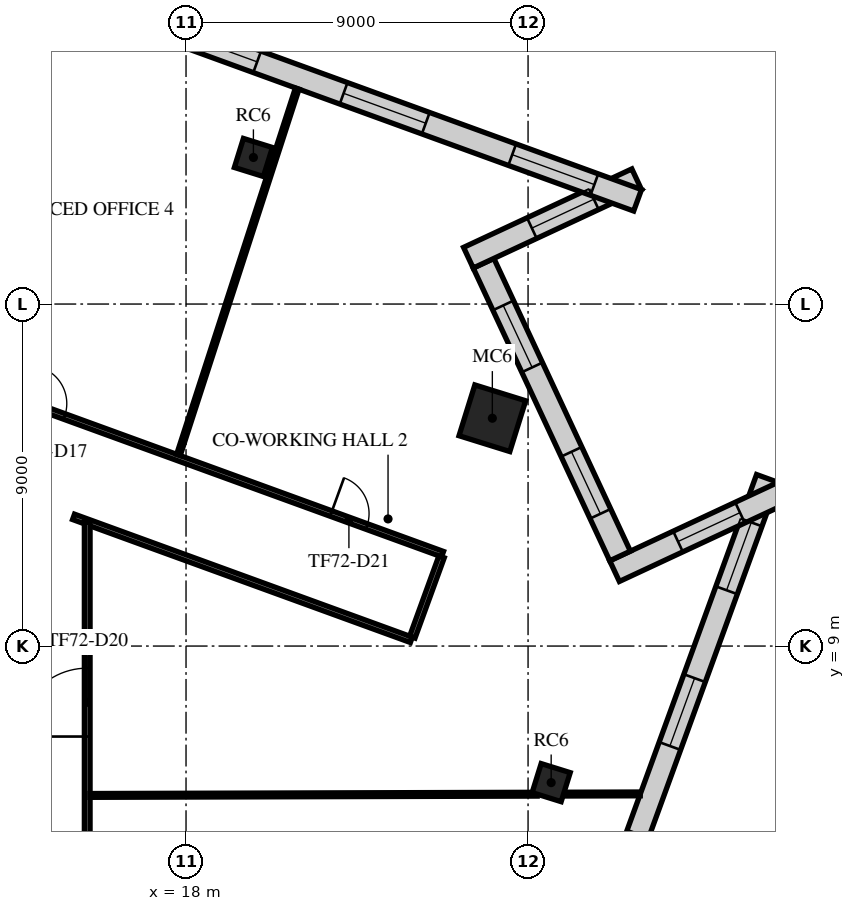
"""IFC4 building model, lengths in metres.
Left out: names, types, materials, properties, quantities, classifications, styles, units other than length and angle.
Written with IfcOpenShell. Run it as: python <this file> out.ifc"""

import sys

from ifc_helpers import new_model, si_unit, direction, frame, frame_2d, origin, origin_2d, place, context, subcontext, project, spatial, rectangle, extrude, element, fill, save


model = new_model("IFC4")
c1 = context("Model", 3, precision=1e-05, world=origin(), true_north=direction((0.0, 1.0)))
c2 = subcontext(c1, "Body", "Model", "MODEL_VIEW")
j1 = project(units=[si_unit("LENGTHUNIT", "METRE"), si_unit("PLANEANGLEUNIT", "RADIAN")], contexts=[c1])
p1 = place(None, origin())
s1 = spatial("IfcSite", under=j1, at=p1, CompositionType="ELEMENT")
p2 = place(p1, origin())
s2 = spatial("IfcBuilding", under=s1, at=p2, CompositionType="ELEMENT")
p3 = place(p2, frame((0.0, 0.0, 304.5)))
s3 = spatial("IfcBuildingStorey", under=s2, at=p3, CompositionType="ELEMENT", Elevation=304.5)
p4 = place(p3, frame((27.608, 5.406, 0.0), z_axis=(0.0, 0.0, 1.0), x_axis=(0.297503182032, 0.954720826567, 0.0)))
e1 = element("IfcColumn", 1, at=p4, inside=s3, PredefinedType="COLUMN", context=c2, shape_type="SweptSolid", body=[
    extrude(rectangle(XDim=0.8, YDim=0.8, at=origin_2d()), origin(), (0.0, 0.0, 1.0), 4.0),
])
p5 = place(p3, frame((26.06, 14.995, 0.0), z_axis=(0.0, 0.0, 1.0), x_axis=(0.297503182032, 0.954720826567, 0.0)))
e2 = element("IfcColumn", 2, at=p5, inside=s3, PredefinedType="COLUMN", context=c2, shape_type="SweptSolid", body=[
    extrude(rectangle(XDim=1.4, YDim=1.4, at=origin_2d()), origin(), (0.0, 0.0, 1.0), 4.0),
])
p6 = place(p3, frame((19.773, 21.857, 0.0), z_axis=(0.0, 0.0, 1.0), x_axis=(0.297503182032, 0.954720826567, 0.0)))
e3 = element("IfcColumn", 3, at=p6, inside=s3, PredefinedType="COLUMN", context=c2, shape_type="SweptSolid", body=[
    extrude(rectangle(XDim=0.8, YDim=0.8, at=origin_2d()), origin(), (0.0, 0.0, 1.0), 4.0),
])
p7 = place(p3, frame((16.885, -31.675, 0.0), z_axis=(0.0, 0.0, 1.0), x_axis=(0.342016786282, 0.939693842643, 0.0)))
e4 = element("IfcWall", 4, at=p7, inside=s3, PredefinedType="STANDARD", context=c2, shape_type="SweptSolid", body=[
    extrude(rectangle(XDim=47.979, YDim=0.6, at=frame_2d((23.99, 0.0))), origin(), (0.0, 0.0, 1.0), 3.65),
])
p8 = place(p7, frame((1.231, 0.0, 0.9)))
e5 = element("IfcOpeningElement", 5, at=p8, cuts=e4, PredefinedType="OPENING", context=c2, shape_type="SweptSolid", body=[
    extrude(rectangle(XDim=1.9, YDim=2.1, at=frame_2d((0.95, 1.05))), frame((0.0, 0.31, 0.0), z_axis=(0.0, -1.0, 0.0), x_axis=(1.0, 0.0, 0.0)), (0.0, 0.0, 1.0), 0.62),
])
p9 = place(p7, frame((5.593, 0.0, 0.9)))
e6 = element("IfcOpeningElement", 6, at=p9, cuts=e4, PredefinedType="OPENING", context=c2, shape_type="SweptSolid", body=[
    extrude(rectangle(XDim=1.9, YDim=2.1, at=frame_2d((0.95, 1.05))), frame((0.0, 0.31, 0.0), z_axis=(0.0, -1.0, 0.0), x_axis=(1.0, 0.0, 0.0)), (0.0, 0.0, 1.0), 0.62),
])
p10 = place(p7, frame((9.954, 0.0, 0.9)))
e7 = element("IfcOpeningElement", 7, at=p10, cuts=e4, PredefinedType="OPENING", context=c2, shape_type="SweptSolid", body=[
    extrude(rectangle(XDim=1.9, YDim=2.1, at=frame_2d((0.95, 1.05))), frame((0.0, 0.31, 0.0), z_axis=(0.0, -1.0, 0.0), x_axis=(1.0, 0.0, 0.0)), (0.0, 0.0, 1.0), 0.62),
])
p11 = place(p7, frame((14.316, 0.0, 0.9)))
e8 = element("IfcOpeningElement", 8, at=p11, cuts=e4, PredefinedType="OPENING", context=c2, shape_type="SweptSolid", body=[
    extrude(rectangle(XDim=1.9, YDim=2.1, at=frame_2d((0.95, 1.05))), frame((0.0, 0.31, 0.0), z_axis=(0.0, -1.0, 0.0), x_axis=(1.0, 0.0, 0.0)), (0.0, 0.0, 1.0), 0.62),
])
p12 = place(p7, frame((18.678, 0.0, 0.9)))
e9 = element("IfcOpeningElement", 9, at=p12, cuts=e4, PredefinedType="OPENING", context=c2, shape_type="SweptSolid", body=[
    extrude(rectangle(XDim=1.9, YDim=2.1, at=frame_2d((0.95, 1.05))), frame((0.0, 0.31, 0.0), z_axis=(0.0, -1.0, 0.0), x_axis=(1.0, 0.0, 0.0)), (0.0, 0.0, 1.0), 0.62),
])
p13 = place(p7, frame((23.04, 0.0, 0.9)))
e10 = element("IfcOpeningElement", 10, at=p13, cuts=e4, PredefinedType="OPENING", context=c2, shape_type="SweptSolid", body=[
    extrude(rectangle(XDim=1.9, YDim=2.1, at=frame_2d((0.95, 1.05))), frame((0.0, 0.31, 0.0), z_axis=(0.0, -1.0, 0.0), x_axis=(1.0, 0.0, 0.0)), (0.0, 0.0, 1.0), 0.62),
])
p14 = place(p7, frame((27.401, 0.0, 0.9)))
e11 = element("IfcOpeningElement", 11, at=p14, cuts=e4, PredefinedType="OPENING", context=c2, shape_type="SweptSolid", body=[
    extrude(rectangle(XDim=1.9, YDim=2.1, at=frame_2d((0.95, 1.05))), frame((0.0, 0.31, 0.0), z_axis=(0.0, -1.0, 0.0), x_axis=(1.0, 0.0, 0.0)), (0.0, 0.0, 1.0), 0.62),
])
p15 = place(p7, frame((31.763, 0.0, 0.9)))
e12 = element("IfcOpeningElement", 12, at=p15, cuts=e4, PredefinedType="OPENING", context=c2, shape_type="SweptSolid", body=[
    extrude(rectangle(XDim=1.9, YDim=2.1, at=frame_2d((0.95, 1.05))), frame((0.0, 0.31, 0.0), z_axis=(0.0, -1.0, 0.0), x_axis=(1.0, 0.0, 0.0)), (0.0, 0.0, 1.0), 0.62),
])
p16 = place(p7, frame((36.125, 0.0, 0.9)))
e13 = element("IfcOpeningElement", 13, at=p16, cuts=e4, PredefinedType="OPENING", context=c2, shape_type="SweptSolid", body=[
    extrude(rectangle(XDim=1.9, YDim=2.1, at=frame_2d((0.95, 1.05))), frame((0.0, 0.31, 0.0), z_axis=(0.0, -1.0, 0.0), x_axis=(1.0, 0.0, 0.0)), (0.0, 0.0, 1.0), 0.62),
])
p17 = place(p7, frame((40.487, 0.0, 0.9)))
e14 = element("IfcOpeningElement", 14, at=p17, cuts=e4, PredefinedType="OPENING", context=c2, shape_type="SweptSolid", body=[
    extrude(rectangle(XDim=1.9, YDim=2.1, at=frame_2d((0.95, 1.05))), frame((0.0, 0.31, 0.0), z_axis=(0.0, -1.0, 0.0), x_axis=(1.0, 0.0, 0.0)), (0.0, 0.0, 1.0), 0.62),
])
p18 = place(p7, frame((44.848, 0.0, 0.9)))
e15 = element("IfcOpeningElement", 15, at=p18, cuts=e4, PredefinedType="OPENING", context=c2, shape_type="SweptSolid", body=[
    extrude(rectangle(XDim=1.9, YDim=2.1, at=frame_2d((0.95, 1.05))), frame((0.0, 0.31, 0.0), z_axis=(0.0, -1.0, 0.0), x_axis=(1.0, 0.0, 0.0)), (0.0, 0.0, 1.0), 0.62),
])
p19 = place(p3, frame((33.703, 13.036, 0.0), z_axis=(0.0, 0.0, 1.0), x_axis=(-0.906306938878, -0.422620080618, 0.0)))
e16 = element("IfcWall", 16, at=p19, inside=s3, PredefinedType="STANDARD", context=c2, shape_type="SweptSolid", body=[
    extrude(rectangle(XDim=4.885, YDim=0.6, at=frame_2d((2.443, 0.0))), origin(), (0.0, 0.0, 1.0), 3.65),
])
p20 = place(p19, frame((1.243, 0.0, 0.9)))
e17 = element("IfcOpeningElement", 17, at=p20, cuts=e16, PredefinedType="OPENING", context=c2, shape_type="SweptSolid", body=[
    extrude(rectangle(XDim=1.8, YDim=2.1, at=frame_2d((0.9, 1.05))), frame((0.0, 0.31, 0.0), z_axis=(0.0, -1.0, 0.0), x_axis=(1.0, 0.0, 0.0)), (0.0, 0.0, 1.0), 0.62),
])
p21 = place(p3, frame((29.421, 11.37, 0.0), z_axis=(0.0, 0.0, 1.0), x_axis=(-0.42259769246, 0.906317378365, 0.0)))
e18 = element("IfcWall", 18, at=p21, inside=s3, PredefinedType="STANDARD", context=c2, shape_type="SweptSolid", body=[
    extrude(rectangle(XDim=8.5, YDim=0.6, at=frame_2d((4.25, 0.0))), origin(), (0.0, 0.0, 1.0), 3.65),
])
p22 = place(p21, frame((1.225, 0.0, 0.9)))
e19 = element("IfcOpeningElement", 19, at=p22, cuts=e18, PredefinedType="OPENING", context=c2, shape_type="SweptSolid", body=[
    extrude(rectangle(XDim=1.8, YDim=2.1, at=frame_2d((0.9, 1.05))), frame((0.0, 0.31, 0.0), z_axis=(0.0, -1.0, 0.0), x_axis=(1.0, 0.0, 0.0)), (0.0, 0.0, 1.0), 0.62),
])
p23 = place(p21, frame((5.475, 0.0, 0.9)))
e20 = element("IfcOpeningElement", 20, at=p23, cuts=e18, PredefinedType="OPENING", context=c2, shape_type="SweptSolid", body=[
    extrude(rectangle(XDim=1.8, YDim=2.1, at=frame_2d((0.9, 1.05))), frame((0.0, 0.31, 0.0), z_axis=(0.0, -1.0, 0.0), x_axis=(1.0, 0.0, 0.0)), (0.0, 0.0, 1.0), 0.62),
])
p24 = place(p3, frame((25.43, 19.219, 0.0), z_axis=(0.0, 0.0, 1.0), x_axis=(0.906315863802, 0.422600940628, 0.0)))
e21 = element("IfcWall", 21, at=p24, inside=s3, PredefinedType="STANDARD", context=c2, shape_type="SweptSolid", body=[
    extrude(rectangle(XDim=4.886, YDim=0.6, at=frame_2d((2.443, 0.0))), origin(), (0.0, 0.0, 1.0), 3.65),
])
p25 = place(p24, frame((1.843, 0.0, 0.9)))
e22 = element("IfcOpeningElement", 22, at=p25, cuts=e21, PredefinedType="OPENING", context=c2, shape_type="SweptSolid", body=[
    extrude(rectangle(XDim=1.8, YDim=2.1, at=frame_2d((0.9, 1.05))), frame((0.0, 0.31, 0.0), z_axis=(0.0, -1.0, 0.0), x_axis=(1.0, 0.0, 0.0)), (0.0, 0.0, 1.0), 0.62),
])
p26 = place(p3, frame((29.882, 20.73, 0.0), z_axis=(0.0, 0.0, 1.0), x_axis=(-0.939693396491, 0.342018012087, 0.0)))
e23 = element("IfcWall", 23, at=p26, inside=s3, PredefinedType="STANDARD", context=c2, shape_type="SweptSolid", body=[
    extrude(rectangle(XDim=42.49, YDim=0.6, at=frame_2d((21.245, 0.0))), origin(), (0.0, 0.0, 1.0), 3.65),
])
p27 = place(p26, frame((1.21, 0.0, 0.9)))
e24 = element("IfcOpeningElement", 24, at=p27, cuts=e23, PredefinedType="OPENING", context=c2, shape_type="SweptSolid", body=[
    extrude(rectangle(XDim=2.3, YDim=2.1, at=frame_2d((1.15, 1.05))), frame((0.0, 0.31, 0.0), z_axis=(0.0, -1.0, 0.0), x_axis=(1.0, 0.0, 0.0)), (0.0, 0.0, 1.0), 0.62),
])
p28 = place(p26, frame((5.932, 0.0, 0.9)))
e25 = element("IfcOpeningElement", 25, at=p28, cuts=e23, PredefinedType="OPENING", context=c2, shape_type="SweptSolid", body=[
    extrude(rectangle(XDim=2.3, YDim=2.1, at=frame_2d((1.15, 1.05))), frame((0.0, 0.31, 0.0), z_axis=(0.0, -1.0, 0.0), x_axis=(1.0, 0.0, 0.0)), (0.0, 0.0, 1.0), 0.62),
])
p29 = place(p26, frame((10.653, 0.0, 0.9)))
e26 = element("IfcOpeningElement", 26, at=p29, cuts=e23, PredefinedType="OPENING", context=c2, shape_type="SweptSolid", body=[
    extrude(rectangle(XDim=2.3, YDim=2.1, at=frame_2d((1.15, 1.05))), frame((0.0, 0.31, 0.0), z_axis=(0.0, -1.0, 0.0), x_axis=(1.0, 0.0, 0.0)), (0.0, 0.0, 1.0), 0.62),
])
p30 = place(p26, frame((15.374, 0.0, 0.9)))
e27 = element("IfcOpeningElement", 27, at=p30, cuts=e23, PredefinedType="OPENING", context=c2, shape_type="SweptSolid", body=[
    extrude(rectangle(XDim=2.3, YDim=2.1, at=frame_2d((1.15, 1.05))), frame((0.0, 0.31, 0.0), z_axis=(0.0, -1.0, 0.0), x_axis=(1.0, 0.0, 0.0)), (0.0, 0.0, 1.0), 0.62),
])
p31 = place(p26, frame((20.095, 0.0, 0.9)))
e28 = element("IfcOpeningElement", 28, at=p31, cuts=e23, PredefinedType="OPENING", context=c2, shape_type="SweptSolid", body=[
    extrude(rectangle(XDim=2.3, YDim=2.1, at=frame_2d((1.15, 1.05))), frame((0.0, 0.31, 0.0), z_axis=(0.0, -1.0, 0.0), x_axis=(1.0, 0.0, 0.0)), (0.0, 0.0, 1.0), 0.62),
])
p32 = place(p26, frame((24.816, 0.0, 0.9)))
e29 = element("IfcOpeningElement", 29, at=p32, cuts=e23, PredefinedType="OPENING", context=c2, shape_type="SweptSolid", body=[
    extrude(rectangle(XDim=2.3, YDim=2.1, at=frame_2d((1.15, 1.05))), frame((0.0, 0.31, 0.0), z_axis=(0.0, -1.0, 0.0), x_axis=(1.0, 0.0, 0.0)), (0.0, 0.0, 1.0), 0.62),
])
p33 = place(p26, frame((29.537, 0.0, 0.9)))
e30 = element("IfcOpeningElement", 30, at=p33, cuts=e23, PredefinedType="OPENING", context=c2, shape_type="SweptSolid", body=[
    extrude(rectangle(XDim=2.3, YDim=2.1, at=frame_2d((1.15, 1.05))), frame((0.0, 0.31, 0.0), z_axis=(0.0, -1.0, 0.0), x_axis=(1.0, 0.0, 0.0)), (0.0, 0.0, 1.0), 0.62),
])
p34 = place(p26, frame((34.258, 0.0, 0.9)))
e31 = element("IfcOpeningElement", 31, at=p34, cuts=e23, PredefinedType="OPENING", context=c2, shape_type="SweptSolid", body=[
    extrude(rectangle(XDim=2.3, YDim=2.1, at=frame_2d((1.15, 1.05))), frame((0.0, 0.31, 0.0), z_axis=(0.0, -1.0, 0.0), x_axis=(1.0, 0.0, 0.0)), (0.0, 0.0, 1.0), 0.62),
])
p35 = place(p26, frame((38.979, 0.0, 0.9)))
e32 = element("IfcOpeningElement", 32, at=p35, cuts=e23, PredefinedType="OPENING", context=c2, shape_type="SweptSolid", body=[
    extrude(rectangle(XDim=2.3, YDim=2.1, at=frame_2d((1.15, 1.05))), frame((0.0, 0.31, 0.0), z_axis=(0.0, -1.0, 0.0), x_axis=(1.0, 0.0, 0.0)), (0.0, 0.0, 1.0), 0.62),
])
p36 = place(p3, frame((-11.549, 24.631, 0.0), z_axis=(0.0, 0.0, 1.0), x_axis=(0.939685979246, -0.342038390256, 0.0)))
e33 = element("IfcWall", 33, at=p36, inside=s3, PredefinedType="PARTITIONING", context=c2, shape_type="SweptSolid", body=[
    extrude(rectangle(XDim=38.628, YDim=0.15, at=frame_2d((19.314, 0.0))), origin(), (0.0, 0.0, 1.0), 3.25),
])
p37 = place(p36, frame((5.05, 0.0, 0.0)))
e34 = element("IfcOpeningElement", 34, at=p37, cuts=e33, PredefinedType="OPENING", context=c2, shape_type="SweptSolid", body=[
    extrude(rectangle(XDim=1.8, YDim=2.1, at=frame_2d((0.9, 1.05))), frame((0.0, 0.085, 0.0), z_axis=(0.0, -1.0, 0.0), x_axis=(1.0, 0.0, 0.0)), (0.0, 0.0, 1.0), 0.17),
])
p38 = place(p36, frame((10.046, 0.0, 0.0)))
e35 = element("IfcOpeningElement", 35, at=p38, cuts=e33, PredefinedType="OPENING", context=c2, shape_type="SweptSolid", body=[
    extrude(rectangle(XDim=1.0, YDim=2.1, at=frame_2d((0.5, 1.05))), frame((0.0, 0.085, 0.0), z_axis=(0.0, -1.0, 0.0), x_axis=(1.0, 0.0, 0.0)), (0.0, 0.0, 1.0), 0.17),
])
p39 = place(p36, frame((15.561, 0.0, 0.0)))
e36 = element("IfcOpeningElement", 36, at=p39, cuts=e33, PredefinedType="OPENING", context=c2, shape_type="SweptSolid", body=[
    extrude(rectangle(XDim=1.0, YDim=2.1, at=frame_2d((0.5, 1.05))), frame((0.0, 0.085, 0.0), z_axis=(0.0, -1.0, 0.0), x_axis=(1.0, 0.0, 0.0)), (0.0, 0.0, 1.0), 0.17),
])
p40 = place(p36, frame((27.042, 0.0, 0.0)))
e37 = element("IfcOpeningElement", 37, at=p40, cuts=e33, PredefinedType="OPENING", context=c2, shape_type="SweptSolid", body=[
    extrude(rectangle(XDim=1.0, YDim=2.1, at=frame_2d((0.5, 1.05))), frame((0.0, 0.085, 0.0), z_axis=(0.0, -1.0, 0.0), x_axis=(1.0, 0.0, 0.0)), (0.0, 0.0, 1.0), 0.17),
])
p41 = place(p36, frame((35.506, 0.0, 0.0)))
e38 = element("IfcOpeningElement", 38, at=p41, cuts=e33, PredefinedType="OPENING", context=c2, shape_type="SweptSolid", body=[
    extrude(rectangle(XDim=1.0, YDim=2.1, at=frame_2d((0.5, 1.05))), frame((0.0, 0.085, 0.0), z_axis=(0.0, -1.0, 0.0), x_axis=(1.0, 0.0, 0.0)), (0.0, 0.0, 1.0), 0.17),
])
p42 = place(p3, frame((15.04, 12.4, 0.0), z_axis=(0.0, 0.0, 1.0), x_axis=(0.939674306664, -0.34207045677, 0.0)))
e39 = element("IfcWall", 39, at=p42, inside=s3, PredefinedType="PARTITIONING", context=c2, shape_type="SweptSolid", body=[
    extrude(rectangle(XDim=9.459, YDim=0.15, at=frame_2d((4.73, 0.0))), origin(), (0.0, 0.0, 1.0), 3.25),
])
p43 = place(p3, frame((15.4, -15.325, 0.0), z_axis=(0.0, 0.0, 1.0), x_axis=(0.0, 1.0, 0.0)))
e40 = element("IfcWall", 40, at=p43, inside=s3, PredefinedType="PARTITIONING", context=c2, shape_type="SweptSolid", body=[
    extrude(rectangle(XDim=27.593, YDim=0.15, at=frame_2d((13.796, 0.0))), origin(), (0.0, 0.0, 1.0), 3.25),
])
p44 = place(p43, frame((5.267, 0.0, 0.0)))
e41 = element("IfcOpeningElement", 41, at=p44, cuts=e40, PredefinedType="OPENING", context=c2, shape_type="SweptSolid", body=[
    extrude(rectangle(XDim=1.0, YDim=2.1, at=frame_2d((0.5, 1.05))), frame((0.0, 0.085, 0.0), z_axis=(0.0, -1.0, 0.0), x_axis=(1.0, 0.0, 0.0)), (0.0, 0.0, 1.0), 0.17),
])
p45 = place(p43, frame((16.072, 0.0, 0.0)))
e42 = element("IfcOpeningElement", 42, at=p45, cuts=e40, PredefinedType="OPENING", context=c2, shape_type="SweptSolid", body=[
    extrude(rectangle(XDim=1.0, YDim=2.1, at=frame_2d((0.5, 1.05))), frame((0.0, 0.085, 0.0), z_axis=(0.0, -1.0, 0.0), x_axis=(1.0, 0.0, 0.0)), (0.0, 0.0, 1.0), 0.17),
])
p46 = place(p43, frame((21.944, 0.0, 0.0)))
e43 = element("IfcOpeningElement", 43, at=p46, cuts=e40, PredefinedType="OPENING", context=c2, shape_type="SweptSolid", body=[
    extrude(rectangle(XDim=1.8, YDim=2.1, at=frame_2d((0.9, 1.05))), frame((0.0, 0.085, 0.0), z_axis=(0.0, -1.0, 0.0), x_axis=(1.0, 0.0, 0.0)), (0.0, 0.0, 1.0), 0.17),
])
p47 = place(p3, frame((23.955, 9.235, 0.0), z_axis=(0.0, 0.0, 1.0), x_axis=(0.342187433401, 0.939631715313, 0.0)))
e44 = element("IfcWall", 44, at=p47, inside=s3, PredefinedType="PARTITIONING", context=c2, shape_type="SweptSolid", body=[
    extrude(rectangle(XDim=2.25, YDim=0.15, at=frame_2d((1.125, 0.0))), origin(), (0.0, 0.0, 1.0), 3.25),
])
p48 = place(p3, frame((15.475, 5.069, 0.0), z_axis=(0.0, 0.0, 1.0), x_axis=(0.999996133827, 0.00278070684, 0.0)))
e45 = element("IfcWall", 45, at=p48, inside=s3, PredefinedType="PARTITIONING", context=c2, shape_type="SweptSolid", body=[
    extrude(rectangle(XDim=11.765, YDim=0.1, at=frame_2d((5.882, 0.0))), origin(), (0.0, 0.0, 1.0), 3.13),
])
p49 = place(p3, frame((17.801, 14.03, 0.0), z_axis=(0.0, 0.0, 1.0), x_axis=(0.308373882016, 0.951265235826, 0.0)))
e46 = element("IfcWall", 46, at=p49, inside=s3, PredefinedType="PARTITIONING", context=c2, shape_type="SweptSolid", body=[
    extrude(rectangle(XDim=10.132, YDim=0.1, at=frame_2d((5.066, 0.0))), origin(), (0.0, 0.0, 1.0), 3.05),
])
p50 = place(p3, frame((27.933, 5.104, 0.0), z_axis=(0.0, 0.0, 1.0), x_axis=(0.999996132662, 0.002781125883, 0.0)))
e47 = element("IfcWall", 47, at=p50, inside=s3, PredefinedType="PARTITIONING", context=c2, shape_type="SweptSolid", body=[
    extrude(rectangle(XDim=2.019, YDim=0.1, at=frame_2d((1.01, 0.0))), origin(), (0.0, 0.0, 1.0), 3.65),
])
p51 = place(p17, origin())
e48 = element("IfcWindow", 48, at=p51, inside=s3, PartitioningType="SINGLE_PANEL", PredefinedType="WINDOW", context=c2, shape_type="SweptSolid", body=[
    extrude(rectangle(XDim=1.9, YDim=2.1, at=frame_2d((0.95, 1.05))), frame((0.0, 0.03, 0.0), z_axis=(0.0, -1.0, 0.0), x_axis=(1.0, 0.0, 0.0)), (0.0, 0.0, 1.0), 0.06),
])
fill(e14, e48)
p52 = place(p18, origin())
e49 = element("IfcWindow", 49, at=p52, inside=s3, PartitioningType="SINGLE_PANEL", PredefinedType="WINDOW", context=c2, shape_type="SweptSolid", body=[
    extrude(rectangle(XDim=1.9, YDim=2.1, at=frame_2d((0.95, 1.05))), frame((0.0, 0.03, 0.0), z_axis=(0.0, -1.0, 0.0), x_axis=(1.0, 0.0, 0.0)), (0.0, 0.0, 1.0), 0.06),
])
fill(e15, e49)
p53 = place(p20, origin())
e50 = element("IfcWindow", 50, at=p53, inside=s3, PartitioningType="SINGLE_PANEL", PredefinedType="WINDOW", context=c2, shape_type="SweptSolid", body=[
    extrude(rectangle(XDim=1.8, YDim=2.1, at=frame_2d((0.9, 1.05))), frame((0.0, 0.03, 0.0), z_axis=(0.0, -1.0, 0.0), x_axis=(1.0, 0.0, 0.0)), (0.0, 0.0, 1.0), 0.06),
])
fill(e17, e50)
p54 = place(p22, origin())
e51 = element("IfcWindow", 51, at=p54, inside=s3, PartitioningType="SINGLE_PANEL", PredefinedType="WINDOW", context=c2, shape_type="SweptSolid", body=[
    extrude(rectangle(XDim=1.8, YDim=2.1, at=frame_2d((0.9, 1.05))), frame((0.0, 0.03, 0.0), z_axis=(0.0, -1.0, 0.0), x_axis=(1.0, 0.0, 0.0)), (0.0, 0.0, 1.0), 0.06),
])
fill(e19, e51)
p55 = place(p23, origin())
e52 = element("IfcWindow", 52, at=p55, inside=s3, PartitioningType="SINGLE_PANEL", PredefinedType="WINDOW", context=c2, shape_type="SweptSolid", body=[
    extrude(rectangle(XDim=1.8, YDim=2.1, at=frame_2d((0.9, 1.05))), frame((0.0, 0.03, 0.0), z_axis=(0.0, -1.0, 0.0), x_axis=(1.0, 0.0, 0.0)), (0.0, 0.0, 1.0), 0.06),
])
fill(e20, e52)
p56 = place(p25, origin())
e53 = element("IfcWindow", 53, at=p56, inside=s3, PartitioningType="SINGLE_PANEL", PredefinedType="WINDOW", context=c2, shape_type="SweptSolid", body=[
    extrude(rectangle(XDim=1.8, YDim=2.1, at=frame_2d((0.9, 1.05))), frame((0.0, 0.03, 0.0), z_axis=(0.0, -1.0, 0.0), x_axis=(1.0, 0.0, 0.0)), (0.0, 0.0, 1.0), 0.06),
])
fill(e22, e53)
p57 = place(p27, origin())
e54 = element("IfcWindow", 54, at=p57, inside=s3, PartitioningType="SINGLE_PANEL", PredefinedType="WINDOW", context=c2, shape_type="SweptSolid", body=[
    extrude(rectangle(XDim=2.3, YDim=2.1, at=frame_2d((1.15, 1.05))), frame((0.0, 0.03, 0.0), z_axis=(0.0, -1.0, 0.0), x_axis=(1.0, 0.0, 0.0)), (0.0, 0.0, 1.0), 0.06),
])
fill(e24, e54)
p58 = place(p28, origin())
e55 = element("IfcWindow", 55, at=p58, inside=s3, PartitioningType="SINGLE_PANEL", PredefinedType="WINDOW", context=c2, shape_type="SweptSolid", body=[
    extrude(rectangle(XDim=2.3, YDim=2.1, at=frame_2d((1.15, 1.05))), frame((0.0, 0.03, 0.0), z_axis=(0.0, -1.0, 0.0), x_axis=(1.0, 0.0, 0.0)), (0.0, 0.0, 1.0), 0.06),
])
fill(e25, e55)
p59 = place(p29, origin())
e56 = element("IfcWindow", 56, at=p59, inside=s3, PartitioningType="SINGLE_PANEL", PredefinedType="WINDOW", context=c2, shape_type="SweptSolid", body=[
    extrude(rectangle(XDim=2.3, YDim=2.1, at=frame_2d((1.15, 1.05))), frame((0.0, 0.03, 0.0), z_axis=(0.0, -1.0, 0.0), x_axis=(1.0, 0.0, 0.0)), (0.0, 0.0, 1.0), 0.06),
])
fill(e26, e56)
p60 = place(p40, origin())
e57 = element("IfcDoor", 57, at=p60, inside=s3, OperationType="SINGLE_SWING_RIGHT", PredefinedType="DOOR", context=c2, shape_type="SweptSolid", body=[
    extrude(rectangle(XDim=1.0, YDim=2.1, at=frame_2d((0.5, 1.05))), frame((0.0, 0.025, 0.0), z_axis=(0.0, -1.0, 0.0), x_axis=(1.0, 0.0, 0.0)), (0.0, 0.0, 1.0), 0.05),
])
fill(e37, e57)
p61 = place(p46, frame((1.8, 0.0, 0.0), z_axis=(0.0, 0.0, 1.0), x_axis=(-1.0, 0.0, 0.0)))
e58 = element("IfcDoor", 58, at=p61, inside=s3, OperationType="DOUBLE_DOOR_SINGLE_SWING", PredefinedType="DOOR", context=c2, shape_type="SweptSolid", body=[
    extrude(rectangle(XDim=1.8, YDim=2.1, at=frame_2d((0.9, 1.05))), frame((0.0, 0.025, 0.0), z_axis=(0.0, -1.0, 0.0), x_axis=(1.0, 0.0, 0.0)), (0.0, 0.0, 1.0), 0.05),
])
fill(e43, e58)
p62 = place(p41, origin())
e59 = element("IfcDoor", 59, at=p62, inside=s3, OperationType="SINGLE_SWING_LEFT", PredefinedType="DOOR", context=c2, shape_type="SweptSolid", body=[
    extrude(rectangle(XDim=1.0, YDim=2.1, at=frame_2d((0.5, 1.05))), frame((0.0, 0.025, 0.0), z_axis=(0.0, -1.0, 0.0), x_axis=(1.0, 0.0, 0.0)), (0.0, 0.0, 1.0), 0.05),
])
fill(e38, e59)
save(model, sys.argv[1])
